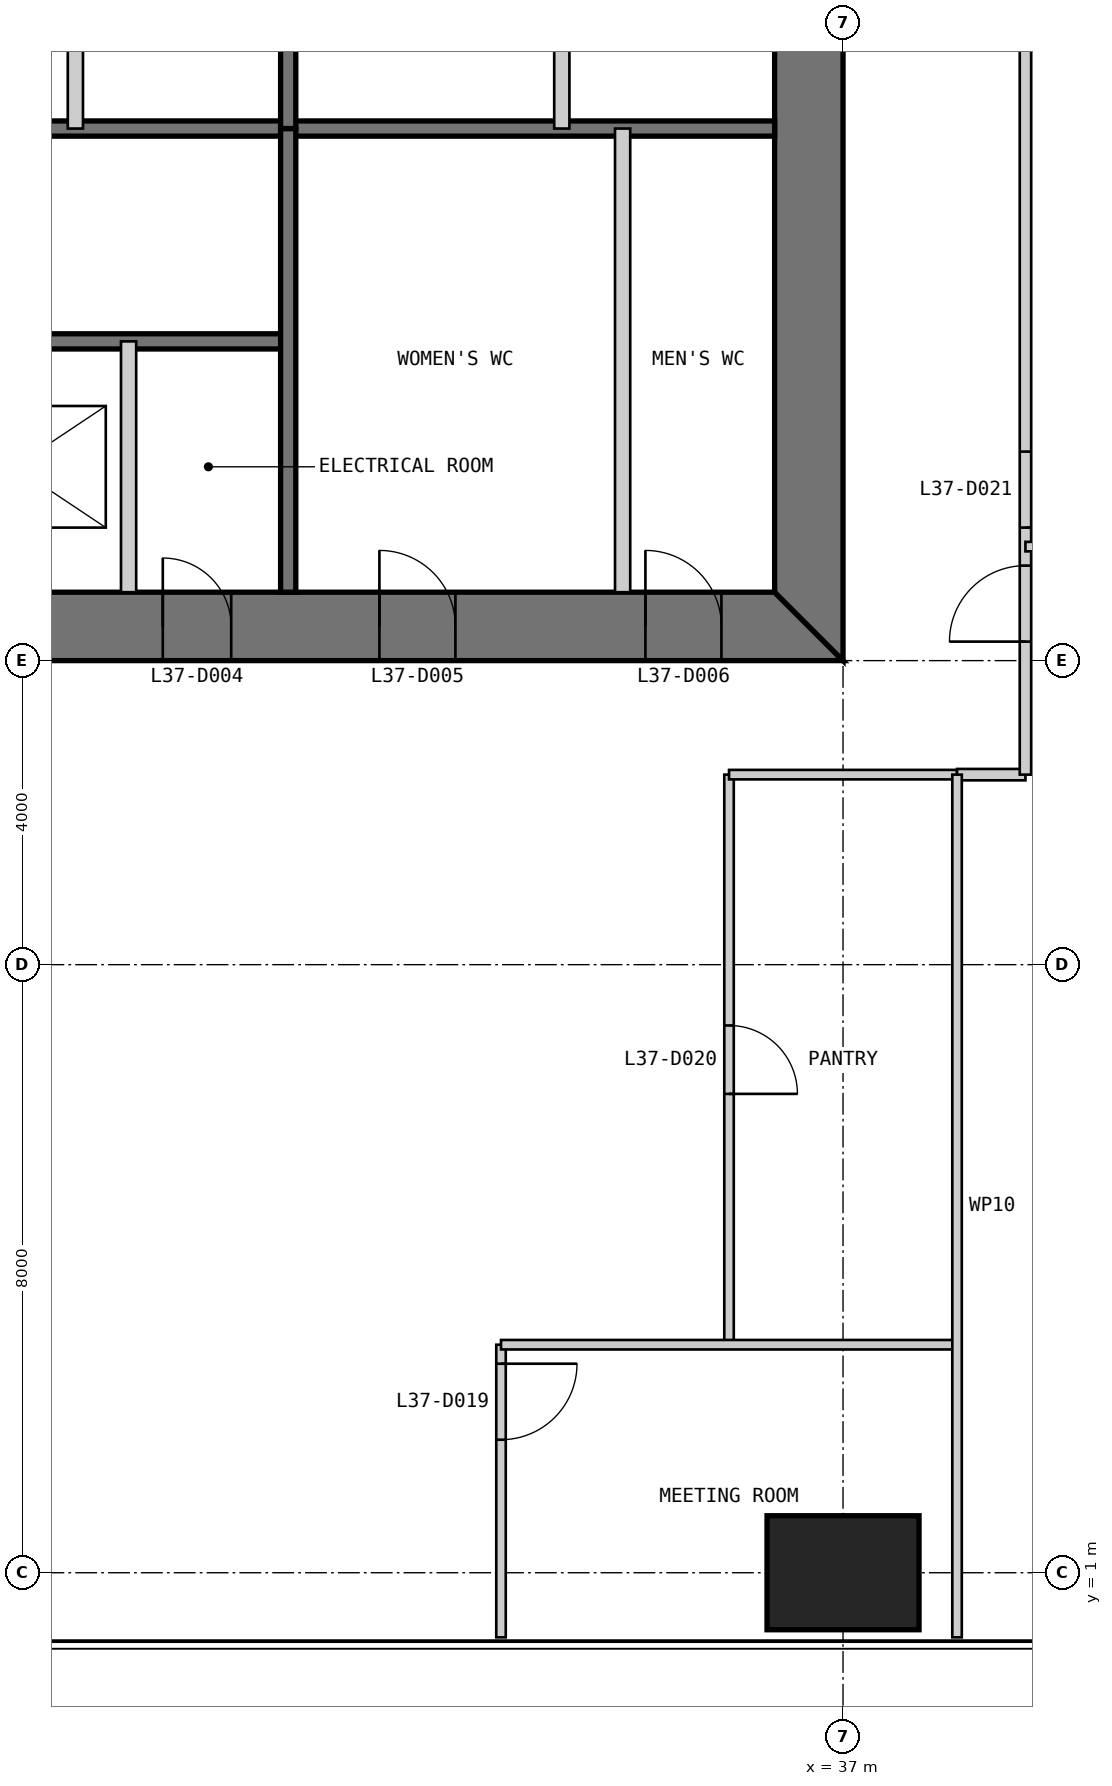
"""IFC4 building model, lengths in metres.
Left out: names, types, materials, properties, quantities, classifications, styles, units other than length and angle.
Written with IfcOpenShell. Run it as: python <this file> out.ifc"""

import sys

from ifc_helpers import new_model, si_unit, direction, frame, frame_2d, origin, origin_2d, place, context, subcontext, project, spatial, polyline, rectangle, outline, extrude, element, fill, save


model = new_model("IFC4")
c1 = context("Model", 3, precision=1e-05, world=origin(), true_north=direction((0.0, 1.0)))
c2 = subcontext(c1, "Body", "Model", "MODEL_VIEW")
j1 = project(units=[si_unit("LENGTHUNIT", "METRE"), si_unit("PLANEANGLEUNIT", "RADIAN")], contexts=[c1])
p1 = place(None, origin())
s1 = spatial("IfcSite", under=j1, at=p1, CompositionType="ELEMENT")
p2 = place(p1, origin())
s2 = spatial("IfcBuilding", under=s1, at=p2, CompositionType="ELEMENT")
p3 = place(p2, frame((0.0, 0.0, 158.4)))
s3 = spatial("IfcBuildingStorey", under=s2, at=p3, CompositionType="ELEMENT", Elevation=158.4)
p4 = place(p3, frame((37.0, 1.0, 0.0), z_axis=(0.0, 0.0, 1.0), x_axis=(1.0, 0.0, 0.0)))
e1 = element("IfcColumn", 1, at=p4, inside=s3, PredefinedType="COLUMN", context=c2, shape_type="SweptSolid", body=[
    extrude(rectangle(XDim=2.0, YDim=1.5, at=origin_2d()), origin(), (0.0, 0.0, 1.0), 4.0),
])
p5 = place(p3, frame((13.0, 13.45, 0.0), z_axis=(0.0, 0.0, 1.0), x_axis=(1.0, 0.0, 0.0)))
e2 = element("IfcWall", 2, at=p5, inside=s3, PredefinedType="SHEAR", context=c2, shape_type="SweptSolid", body=[
    extrude(outline(polyline([(0.0, -0.45), (24.0, -0.45), (23.1, 0.45), (0.9, 0.45), (0.0, -0.45)])), origin(), (0.0, 0.0, 1.0), 4.0),
])
p6 = place(p5, frame((4.9, 0.0, 0.0)))
e3 = element("IfcOpeningElement", 3, at=p6, cuts=e2, PredefinedType="OPENING", context=c2, shape_type="SweptSolid", body=[
    extrude(rectangle(XDim=1.0, YDim=2.2, at=frame_2d((0.5, 1.1))), frame((0.0, 0.46, 0.0), z_axis=(0.0, -1.0, 0.0), x_axis=(1.0, 0.0, 0.0)), (0.0, 0.0, 1.0), 0.92),
])
p7 = place(p5, frame((8.9, 0.0, 0.0)))
e4 = element("IfcOpeningElement", 4, at=p7, cuts=e2, PredefinedType="OPENING", context=c2, shape_type="SweptSolid", body=[
    extrude(rectangle(XDim=1.1, YDim=2.2, at=frame_2d((0.55, 1.1))), frame((0.0, 0.46, 0.0), z_axis=(0.0, -1.0, 0.0), x_axis=(1.0, 0.0, 0.0)), (0.0, 0.0, 1.0), 0.92),
])
p8 = place(p5, frame((15.05, 0.0, 0.0)))
e5 = element("IfcOpeningElement", 5, at=p8, cuts=e2, PredefinedType="OPENING", context=c2, shape_type="SweptSolid", body=[
    extrude(rectangle(XDim=0.9, YDim=2.2, at=frame_2d((0.45, 1.1))), frame((0.0, 0.46, 0.0), z_axis=(0.0, -1.0, 0.0), x_axis=(1.0, 0.0, 0.0)), (0.0, 0.0, 1.0), 0.92),
])
p9 = place(p5, frame((17.9, 0.0, 0.0)))
e6 = element("IfcOpeningElement", 6, at=p9, cuts=e2, PredefinedType="OPENING", context=c2, shape_type="SweptSolid", body=[
    extrude(rectangle(XDim=1.0, YDim=2.2, at=frame_2d((0.5, 1.1))), frame((0.0, 0.46, 0.0), z_axis=(0.0, -1.0, 0.0), x_axis=(1.0, 0.0, 0.0)), (0.0, 0.0, 1.0), 0.92),
])
p10 = place(p5, frame((21.4, 0.0, 0.0)))
e7 = element("IfcOpeningElement", 7, at=p10, cuts=e2, PredefinedType="OPENING", context=c2, shape_type="SweptSolid", body=[
    extrude(rectangle(XDim=1.0, YDim=2.2, at=frame_2d((0.5, 1.1))), frame((0.0, 0.46, 0.0), z_axis=(0.0, -1.0, 0.0), x_axis=(1.0, 0.0, 0.0)), (0.0, 0.0, 1.0), 0.92),
])
p11 = place(p3, frame((36.55, 13.9, 0.0), z_axis=(0.0, 0.0, 1.0), x_axis=(0.0, 1.0, 0.0)))
e8 = element("IfcWall", 8, at=p11, inside=s3, PredefinedType="SHEAR", context=c2, shape_type="SweptSolid", body=[
    extrude(outline(polyline([(-0.9, -0.45), (23.1, -0.45), (22.2, 0.45), (0.0, 0.45), (-0.9, -0.45)])), origin(), (0.0, 0.0, 1.0), 4.0),
])
p12 = place(p11, frame((20.2, 0.0, 0.0)))
e9 = element("IfcOpeningElement", 9, at=p12, cuts=e8, PredefinedType="OPENING", context=c2, shape_type="SweptSolid", body=[
    extrude(rectangle(XDim=1.0, YDim=2.2, at=frame_2d((0.5, 1.1))), frame((0.0, 0.46, 0.0), z_axis=(0.0, -1.0, 0.0), x_axis=(1.0, 0.0, 0.0)), (0.0, 0.0, 1.0), 0.92),
])
p13 = place(p11, frame((17.25, 0.0, 0.0)))
e10 = element("IfcOpeningElement", 10, at=p13, cuts=e8, PredefinedType="OPENING", context=c2, shape_type="SweptSolid", body=[
    extrude(rectangle(XDim=0.9, YDim=2.2, at=frame_2d((0.45, 1.1))), frame((0.0, 0.46, 0.0), z_axis=(0.0, -1.0, 0.0), x_axis=(1.0, 0.0, 0.0)), (0.0, 0.0, 1.0), 0.92),
])
p14 = place(p3, frame((20.3, 17.2, 0.0), z_axis=(0.0, 0.0, 1.0), x_axis=(1.0, 0.0, 0.0)))
e11 = element("IfcWall", 11, at=p14, inside=s3, PredefinedType="SOLIDWALL", context=c2, shape_type="SweptSolid", body=[
    extrude(rectangle(XDim=9.4, YDim=0.2, at=frame_2d((4.7, 0.0))), origin(), (0.0, 0.0, 1.0), 3.8),
])
p15 = place(p14, frame((0.25, 0.0, 0.0)))
e12 = element("IfcOpeningElement", 12, at=p15, cuts=e11, PredefinedType="OPENING", context=c2, shape_type="SweptSolid", body=[
    extrude(rectangle(XDim=1.0, YDim=2.2, at=frame_2d((0.5, 1.1))), frame((0.0, 0.11, 0.0), z_axis=(0.0, -1.0, 0.0), x_axis=(1.0, 0.0, 0.0)), (0.0, 0.0, 1.0), 0.22),
])
p16 = place(p3, frame((20.3, 20.0, 0.0), z_axis=(0.0, 0.0, 1.0), x_axis=(1.0, 0.0, 0.0)))
e13 = element("IfcWall", 13, at=p16, inside=s3, PredefinedType="SOLIDWALL", context=c2, shape_type="SweptSolid", body=[
    extrude(rectangle(XDim=15.8, YDim=0.2, at=frame_2d((7.9, 0.0))), origin(), (0.0, 0.0, 1.0), 3.8),
])
p17 = place(p3, frame((27.6, 13.9, 0.0), z_axis=(0.0, 0.0, 1.0), x_axis=(0.0, 1.0, 0.0)))
e14 = element("IfcWall", 14, at=p17, inside=s3, PredefinedType="PARTITIONING", context=c2, shape_type="SweptSolid", body=[
    extrude(rectangle(XDim=3.3, YDim=0.2, at=frame_2d((1.65, 0.0))), origin(), (0.0, 0.0, 1.0), 3.8),
])
p18 = place(p3, frame((29.7, 13.9, 0.0), z_axis=(0.0, 0.0, 1.0), x_axis=(0.0, 1.0, 0.0)))
e15 = element("IfcWall", 15, at=p18, inside=s3, PredefinedType="SOLIDWALL", context=c2, shape_type="SweptSolid", body=[
    extrude(rectangle(XDim=6.1, YDim=0.2, at=frame_2d((3.05, 0.0))), origin(), (0.0, 0.0, 1.0), 3.8),
])
p19 = place(p3, frame((34.1, 13.9, 0.0), z_axis=(0.0, 0.0, 1.0), x_axis=(0.0, 1.0, 0.0)))
e16 = element("IfcWall", 16, at=p19, inside=s3, PredefinedType="PARTITIONING", context=c2, shape_type="SweptSolid", body=[
    extrude(rectangle(XDim=6.1, YDim=0.2, at=frame_2d((3.05, 0.0))), origin(), (0.0, 0.0, 1.0), 3.8),
])
p20 = place(p3, frame((33.3, 36.1, 0.0), z_axis=(0.0, 0.0, 1.0), x_axis=(0.0, -1.0, 0.0)))
e17 = element("IfcWall", 17, at=p20, inside=s3, PredefinedType="PARTITIONING", context=c2, shape_type="SweptSolid", body=[
    extrude(rectangle(XDim=16.1, YDim=0.2, at=frame_2d((8.05, 0.0))), origin(), (0.0, 0.0, 1.0), 3.8),
])
p21 = place(p20, frame((4.4, 0.0, 0.0)))
e18 = element("IfcOpeningElement", 18, at=p21, cuts=e17, PredefinedType="OPENING", context=c2, shape_type="SweptSolid", body=[
    extrude(rectangle(XDim=0.9, YDim=2.2, at=frame_2d((0.45, 1.1))), frame((0.0, 0.11, 0.0), z_axis=(0.0, -1.0, 0.0), x_axis=(1.0, 0.0, 0.0)), (0.0, 0.0, 1.0), 0.22),
])
p22 = place(p3, frame((29.7, 36.1, 0.0), z_axis=(0.0, 0.0, 1.0), x_axis=(0.0, -1.0, 0.0)))
e19 = element("IfcWall", 19, at=p22, inside=s3, PredefinedType="SOLIDWALL", context=c2, shape_type="SweptSolid", body=[
    extrude(rectangle(XDim=16.1, YDim=0.2, at=frame_2d((8.05, 0.0))), origin(), (0.0, 0.0, 1.0), 3.8),
])
p23 = place(p3, frame((26.9, 30.0, 0.0), z_axis=(0.0, 0.0, 1.0), x_axis=(0.0, -1.0, 0.0)))
e20 = element("IfcWall", 20, at=p23, inside=s3, PredefinedType="PARTITIONING", context=c2, shape_type="SweptSolid", body=[
    extrude(rectangle(XDim=10.0, YDim=0.2, at=frame_2d((5.0, 0.0))), origin(), (0.0, 0.0, 1.0), 3.8),
])
p24 = place(p3, frame((32.5, 0.15, 0.0), z_axis=(0.0, 0.0, 1.0), x_axis=(0.0, 1.0, 0.0)))
e21 = element("IfcWall", 21, at=p24, inside=s3, PredefinedType="PARTITIONING", context=c2, shape_type="SweptSolid", body=[
    extrude(rectangle(XDim=3.85, YDim=0.125, at=frame_2d((1.925, 0.0))), origin(), (0.0, 0.0, 1.0), 3.8),
])
p25 = place(p24, frame((2.6, 0.0, 0.0)))
e22 = element("IfcOpeningElement", 22, at=p25, cuts=e21, PredefinedType="OPENING", context=c2, shape_type="SweptSolid", body=[
    extrude(rectangle(XDim=1.0, YDim=2.2, at=frame_2d((0.5, 1.1))), frame((0.0, 0.073, 0.0), z_axis=(0.0, -1.0, 0.0), x_axis=(1.0, 0.0, 0.0)), (0.0, 0.0, 1.0), 0.145),
])
p26 = place(p3, frame((35.5, 4.0, 0.0), z_axis=(0.0, 0.0, 1.0), x_axis=(0.0, 1.0, 0.0)))
e23 = element("IfcWall", 23, at=p26, inside=s3, PredefinedType="PARTITIONING", context=c2, shape_type="SweptSolid", body=[
    extrude(rectangle(XDim=7.5, YDim=0.125, at=frame_2d((3.75, 0.0))), origin(), (0.0, 0.0, 1.0), 3.8),
])
p27 = place(p26, frame((3.3, 0.0, 0.0)))
e24 = element("IfcOpeningElement", 24, at=p27, cuts=e23, PredefinedType="OPENING", context=c2, shape_type="SweptSolid", body=[
    extrude(rectangle(XDim=0.9, YDim=2.2, at=frame_2d((0.45, 1.1))), frame((0.0, 0.073, 0.0), z_axis=(0.0, -1.0, 0.0), x_axis=(1.0, 0.0, 0.0)), (0.0, 0.0, 1.0), 0.145),
])
p28 = place(p3, frame((32.5, 4.0, 0.0), z_axis=(0.0, 0.0, 1.0), x_axis=(1.0, 0.0, 0.0)))
e25 = element("IfcWall", 25, at=p28, inside=s3, PredefinedType="PARTITIONING", context=c2, shape_type="SweptSolid", body=[
    extrude(rectangle(XDim=6.0, YDim=0.125, at=frame_2d((3.0, 0.0))), origin(), (0.0, 0.0, 1.0), 3.8),
])
p29 = place(p3, frame((35.5, 11.5, 0.0), z_axis=(0.0, 0.0, 1.0), x_axis=(1.0, 0.0, 0.0)))
e26 = element("IfcWall", 26, at=p29, inside=s3, PredefinedType="PARTITIONING", context=c2, shape_type="SweptSolid", body=[
    extrude(rectangle(XDim=3.0, YDim=0.125, at=frame_2d((1.5, 0.0))), origin(), (0.0, 0.0, 1.0), 3.8),
])
p30 = place(p3, frame((38.5, 11.5, 0.0), z_axis=(0.0, 0.0, 1.0), x_axis=(1.0, 0.0, 0.0)))
e27 = element("IfcWall", 27, at=p30, inside=s3, PredefinedType="PARTITIONING", context=c2, shape_type="SweptSolid", body=[
    extrude(rectangle(XDim=0.9, YDim=0.15, at=frame_2d((0.45, 0.0))), origin(), (0.0, 0.0, 1.0), 3.8),
])
p31 = place(p3, frame((39.4, 11.5, 0.0), z_axis=(0.0, 0.0, 1.0), x_axis=(0.0, 1.0, 0.0)))
e28 = element("IfcWall", 28, at=p31, inside=s3, PredefinedType="PARTITIONING", context=c2, shape_type="SweptSolid", body=[
    extrude(rectangle(XDim=27.9, YDim=0.15, at=frame_2d((13.95, 0.0))), origin(), (0.0, 0.0, 1.0), 3.8),
])
p32 = place(p31, frame((3.25, 0.0, 0.0)))
e29 = element("IfcOpeningElement", 29, at=p32, cuts=e28, PredefinedType="OPENING", context=c2, shape_type="SweptSolid", body=[
    extrude(rectangle(XDim=1.0, YDim=2.2, at=frame_2d((0.5, 1.1))), frame((0.0, 0.085, 0.0), z_axis=(0.0, -1.0, 0.0), x_axis=(1.0, 0.0, 0.0)), (0.0, 0.0, 1.0), 0.17),
])
p33 = place(p31, frame((22.75, 0.0, 0.0)))
e30 = element("IfcOpeningElement", 30, at=p33, cuts=e28, PredefinedType="OPENING", context=c2, shape_type="SweptSolid", body=[
    extrude(rectangle(XDim=1.0, YDim=2.2, at=frame_2d((0.5, 1.1))), frame((0.0, 0.085, 0.0), z_axis=(0.0, -1.0, 0.0), x_axis=(1.0, 0.0, 0.0)), (0.0, 0.0, 1.0), 0.17),
])
p34 = place(p31, frame((1.75, 0.0, 0.0)))
e31 = element("IfcOpeningElement", 31, at=p34, cuts=e28, PredefinedType="OPENING", context=c2, shape_type="SweptSolid", body=[
    extrude(rectangle(XDim=1.0, YDim=2.2, at=frame_2d((0.5, 1.1))), frame((0.0, 0.085, 0.0), z_axis=(0.0, -1.0, 0.0), x_axis=(1.0, 0.0, 0.0)), (0.0, 0.0, 1.0), 0.17),
])
p35 = place(p3, frame((38.5, 0.15, 0.0), z_axis=(0.0, 0.0, 1.0), x_axis=(0.0, 1.0, 0.0)))
e32 = element("IfcWall", 32, at=p35, inside=s3, PredefinedType="PARTITIONING", context=c2, shape_type="SweptSolid", body=[
    extrude(rectangle(XDim=11.35, YDim=0.125, at=frame_2d((5.675, 0.0))), origin(), (0.0, 0.0, 1.0), 3.8),
])
p36 = place(p3, frame((46.0, 14.5, 0.0), z_axis=(0.0, 0.0, 1.0), x_axis=(-1.0, 0.0, 0.0)))
e33 = element("IfcWall", 33, at=p36, inside=s3, PredefinedType="PARTITIONING", context=c2, shape_type="SweptSolid", body=[
    extrude(rectangle(XDim=6.6, YDim=0.125, at=frame_2d((3.3, 0.0))), origin(), (0.0, 0.0, 1.0), 3.8),
])
p37 = place(p8, origin())
e34 = element("IfcDoor", 34, at=p37, inside=s3, OperationType="SINGLE_SWING_LEFT", PredefinedType="DOOR", context=c2, shape_type="SweptSolid", body=[
    extrude(rectangle(XDim=0.9, YDim=2.2, at=frame_2d((0.45, 1.1))), frame((0.0, 0.025, 0.0), z_axis=(0.0, -1.0, 0.0), x_axis=(1.0, 0.0, 0.0)), (0.0, 0.0, 1.0), 0.05),
    extrude(outline(polyline([(0.0, 0.0), (0.04, 0.0), (0.04, 2.16), (0.86, 2.16), (0.86, 0.0), (0.9, 0.0), (0.9, 2.2), (0.0, 2.2), (0.0, 0.0)])), frame((0.0, 0.3, 0.0), z_axis=(0.0, -1.0, 0.0), x_axis=(1.0, 0.0, 0.0)), (0.0, 0.0, 1.0), 0.6),
])
fill(e5, e34)
p38 = place(p9, origin())
e35 = element("IfcDoor", 35, at=p38, inside=s3, OperationType="SINGLE_SWING_LEFT", PredefinedType="DOOR", context=c2, shape_type="SweptSolid", body=[
    extrude(rectangle(XDim=1.0, YDim=2.2, at=frame_2d((0.5, 1.1))), frame((0.0, 0.025, 0.0), z_axis=(0.0, -1.0, 0.0), x_axis=(1.0, 0.0, 0.0)), (0.0, 0.0, 1.0), 0.05),
    extrude(outline(polyline([(0.0, 0.0), (0.04, 0.0), (0.04, 2.16), (0.96, 2.16), (0.96, 0.0), (1.0, 0.0), (1.0, 2.2), (0.0, 2.2), (0.0, 0.0)])), frame((0.0, 0.3, 0.0), z_axis=(0.0, -1.0, 0.0), x_axis=(1.0, 0.0, 0.0)), (0.0, 0.0, 1.0), 0.6),
])
fill(e6, e35)
p39 = place(p10, origin())
e36 = element("IfcDoor", 36, at=p39, inside=s3, OperationType="SINGLE_SWING_LEFT", PredefinedType="DOOR", context=c2, shape_type="SweptSolid", body=[
    extrude(rectangle(XDim=1.0, YDim=2.2, at=frame_2d((0.5, 1.1))), frame((0.0, 0.025, 0.0), z_axis=(0.0, -1.0, 0.0), x_axis=(1.0, 0.0, 0.0)), (0.0, 0.0, 1.0), 0.05),
    extrude(outline(polyline([(0.0, 0.0), (0.04, 0.0), (0.04, 2.16), (0.96, 2.16), (0.96, 0.0), (1.0, 0.0), (1.0, 2.2), (0.0, 2.2), (0.0, 0.0)])), frame((0.0, 0.3, 0.0), z_axis=(0.0, -1.0, 0.0), x_axis=(1.0, 0.0, 0.0)), (0.0, 0.0, 1.0), 0.6),
])
fill(e7, e36)
p40 = place(p25, frame((1.0, 0.0, 0.0), z_axis=(0.0, 0.0, 1.0), x_axis=(-1.0, 0.0, 0.0)))
e37 = element("IfcDoor", 37, at=p40, inside=s3, OperationType="SINGLE_SWING_LEFT", PredefinedType="DOOR", context=c2, shape_type="SweptSolid", body=[
    extrude(rectangle(XDim=1.0, YDim=2.2, at=frame_2d((0.5, 1.1))), frame((0.0, 0.025, 0.0), z_axis=(0.0, -1.0, 0.0), x_axis=(1.0, 0.0, 0.0)), (0.0, 0.0, 1.0), 0.05),
])
fill(e22, e37)
p41 = place(p27, frame((0.9, 0.0, 0.0), z_axis=(0.0, 0.0, 1.0), x_axis=(-1.0, 0.0, 0.0)))
e38 = element("IfcDoor", 38, at=p41, inside=s3, OperationType="SINGLE_SWING_RIGHT", PredefinedType="DOOR", context=c2, shape_type="SweptSolid", body=[
    extrude(rectangle(XDim=0.9, YDim=2.2, at=frame_2d((0.45, 1.1))), frame((0.0, 0.025, 0.0), z_axis=(0.0, -1.0, 0.0), x_axis=(1.0, 0.0, 0.0)), (0.0, 0.0, 1.0), 0.05),
])
fill(e24, e38)
p42 = place(p32, frame((1.0, 0.0, 0.0), z_axis=(0.0, 0.0, 1.0), x_axis=(-1.0, 0.0, 0.0)))
e39 = element("IfcDoor", 39, at=p42, inside=s3, OperationType="SINGLE_SWING_RIGHT", PredefinedType="DOOR", context=c2, shape_type="SweptSolid", body=[
    extrude(rectangle(XDim=1.0, YDim=2.2, at=frame_2d((0.5, 1.1))), frame((0.0, 0.025, 0.0), z_axis=(0.0, -1.0, 0.0), x_axis=(1.0, 0.0, 0.0)), (0.0, 0.0, 1.0), 0.05),
])
fill(e29, e39)
p43 = place(p34, origin())
e40 = element("IfcDoor", 40, at=p43, inside=s3, OperationType="SINGLE_SWING_LEFT", PredefinedType="DOOR", context=c2, shape_type="SweptSolid", body=[
    extrude(rectangle(XDim=1.0, YDim=2.2, at=frame_2d((0.5, 1.1))), frame((0.0, 0.025, 0.0), z_axis=(0.0, -1.0, 0.0), x_axis=(1.0, 0.0, 0.0)), (0.0, 0.0, 1.0), 0.05),
])
fill(e31, e40)
save(model, sys.argv[1])
